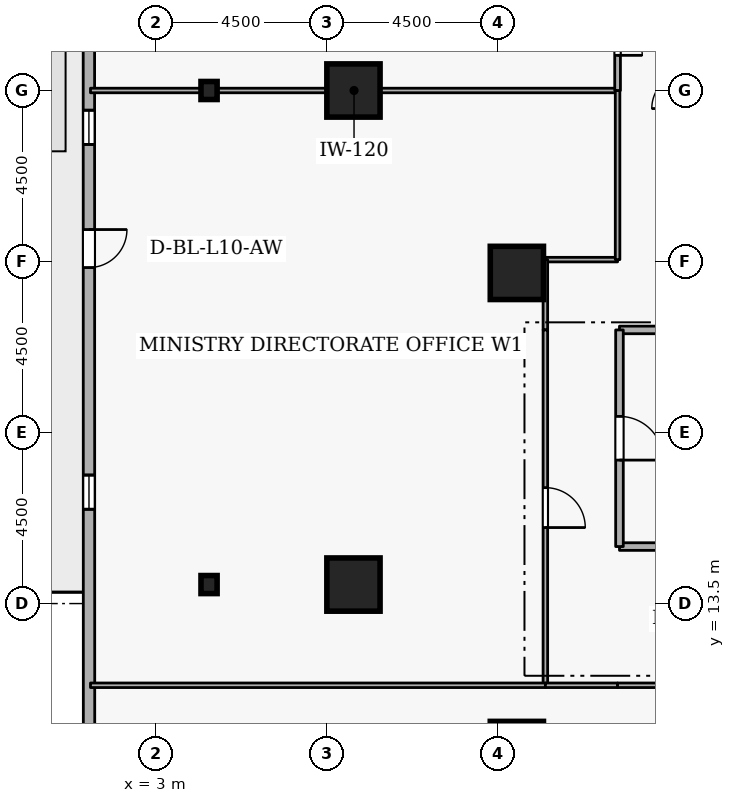
"""IFC4 building model, lengths in metres.
Left out: names, types, materials, properties, quantities, classifications, styles, units other than length and angle.
Written with IfcOpenShell. Run it as: python <this file> out.ifc"""

import sys

from ifc_helpers import new_model, si_unit, direction, frame, frame_2d, origin, origin_2d, place, context, subcontext, project, spatial, rectangle, i_section, extrude, element, fill, save


model = new_model("IFC4")
c1 = context("Model", 3, precision=1e-05, world=origin(), true_north=direction((0.0, 1.0)))
c2 = subcontext(c1, "Body", "Model", "MODEL_VIEW")
j1 = project(units=[si_unit("LENGTHUNIT", "METRE"), si_unit("PLANEANGLEUNIT", "RADIAN")], contexts=[c1])
p1 = place(None, origin())
s1 = spatial("IfcSite", under=j1, at=p1, CompositionType="ELEMENT")
p2 = place(p1, origin())
s2 = spatial("IfcBuilding", under=s1, at=p2, CompositionType="ELEMENT")
p3 = place(p2, frame((0.0, 0.0, 42.3)))
s3 = spatial("IfcBuildingStorey", under=s2, at=p3, CompositionType="ELEMENT", Elevation=42.3)
for number, where, z_axis, x_axis in (
    (1, (12.5, 9.7, 0.0), (0.0, 0.0, 1.0), (1.0, 0.0, 0.0)),
    (2, (8.2, 14.0, 0.0), (0.0, 0.0, 1.0), (1.0, 0.0, 0.0)),
    (3, (8.2, 27.0, 0.0), (0.0, 0.0, 1.0), (1.0, 0.0, 0.0)),
    (4, (12.5, 22.2, 0.0), (0.0, 0.0, 1.0), (1.0, 0.0, 0.0)),
):
    element("IfcColumn", number, at=place(p3, frame(where, z_axis=z_axis, x_axis=x_axis)), inside=s3, PredefinedType="COLUMN", context=c2, shape_type="SweptSolid", body=[
        extrude(rectangle(XDim=1.4, YDim=1.4, at=origin_2d()), origin(), (0.0, 0.0, 1.0), 3.6),
    ])
for number, where, z_axis, x_axis in (
    (5, (4.4, 14.0, 0.0), (0.0, 0.0, 1.0), (1.0, 0.0, 0.0)),
    (6, (4.4, 27.0, 0.0), (0.0, 0.0, 1.0), (1.0, 0.0, 0.0)),
):
    element("IfcColumn", number, at=place(p3, frame(where, z_axis=z_axis, x_axis=x_axis)), inside=s3, PredefinedType="COLUMN", context=c2, shape_type="SweptSolid", body=[
        extrude(i_section(OverallWidth=0.424, OverallDepth=0.475, WebThickness=0.048, FlangeThickness=0.077, FilletRadius=0.015, at=origin_2d()), origin(), (0.0, 0.0, 1.0), 3.6),
    ])
p4 = place(p3, frame((1.235, 42.681, 0.0), z_axis=(0.0, 0.0, 1.0), x_axis=(0.000208784245, -0.999999978205, 0.0)))
e7 = element("IfcWall", 7, at=p4, inside=s3, PredefinedType="STANDARD", context=c2, shape_type="SweptSolid", body=[
    extrude(rectangle(XDim=35.08, YDim=0.3, at=frame_2d((17.54, 0.0))), origin(), (0.0, 0.0, 1.0), 2.7),
])
p5 = place(p4, frame((19.34, 0.0, 0.0)))
e8 = element("IfcOpeningElement", 8, at=p5, cuts=e7, PredefinedType="OPENING", context=c2, shape_type="SweptSolid", body=[
    extrude(rectangle(XDim=1.0, YDim=2.08, at=frame_2d((0.5, 1.04))), frame((0.0, 0.16, 0.0), z_axis=(0.0, -1.0, 0.0), x_axis=(1.0, 0.0, 0.0)), (0.0, 0.0, 1.0), 0.32),
])
p6 = place(p4, frame((1.8, 0.0, 0.72)))
e9 = element("IfcOpeningElement", 9, at=p6, cuts=e7, PredefinedType="OPENING", context=c2, shape_type="SweptSolid", body=[
    extrude(rectangle(XDim=0.9, YDim=1.75, at=frame_2d((0.45, 0.875))), frame((0.0, 0.16, 0.0), z_axis=(0.0, -1.0, 0.0), x_axis=(1.0, 0.0, 0.0)), (0.0, 0.0, 1.0), 0.32),
])
p7 = place(p4, frame((6.6, 0.0, 0.72)))
e10 = element("IfcOpeningElement", 10, at=p7, cuts=e7, PredefinedType="OPENING", context=c2, shape_type="SweptSolid", body=[
    extrude(rectangle(XDim=0.9, YDim=1.75, at=frame_2d((0.45, 0.875))), frame((0.0, 0.16, 0.0), z_axis=(0.0, -1.0, 0.0), x_axis=(1.0, 0.0, 0.0)), (0.0, 0.0, 1.0), 0.32),
])
p8 = place(p4, frame((11.4, 0.0, 0.72)))
e11 = element("IfcOpeningElement", 11, at=p8, cuts=e7, PredefinedType="OPENING", context=c2, shape_type="SweptSolid", body=[
    extrude(rectangle(XDim=0.9, YDim=1.75, at=frame_2d((0.45, 0.875))), frame((0.0, 0.16, 0.0), z_axis=(0.0, -1.0, 0.0), x_axis=(1.0, 0.0, 0.0)), (0.0, 0.0, 1.0), 0.32),
])
p9 = place(p4, frame((16.2, 0.0, 0.72)))
e12 = element("IfcOpeningElement", 12, at=p9, cuts=e7, PredefinedType="OPENING", context=c2, shape_type="SweptSolid", body=[
    extrude(rectangle(XDim=0.9, YDim=1.75, at=frame_2d((0.45, 0.875))), frame((0.0, 0.16, 0.0), z_axis=(0.0, -1.0, 0.0), x_axis=(1.0, 0.0, 0.0)), (0.0, 0.0, 1.0), 0.32),
])
p10 = place(p4, frame((25.8, 0.0, 0.72)))
e13 = element("IfcOpeningElement", 13, at=p10, cuts=e7, PredefinedType="OPENING", context=c2, shape_type="SweptSolid", body=[
    extrude(rectangle(XDim=0.9, YDim=1.75, at=frame_2d((0.45, 0.875))), frame((0.0, 0.16, 0.0), z_axis=(0.0, -1.0, 0.0), x_axis=(1.0, 0.0, 0.0)), (0.0, 0.0, 1.0), 0.32),
])
for number, where, z_axis, x_axis in (
    (14, (15.2, 15.0, 0.0), (0.0, 0.0, 1.0), (1.0, 0.0, 0.0)),
    (15, (17.7, 20.7, 0.0), (0.0, 0.0, 1.0), (-1.0, 0.0, 0.0)),
):
    element("IfcWall", number, at=place(p3, frame(where, z_axis=z_axis, x_axis=x_axis)), inside=s3, PredefinedType="STANDARD", context=c2, shape_type="SweptSolid", body=[
        extrude(rectangle(XDim=2.5, YDim=0.2, at=frame_2d((1.25, 0.0))), origin(), (0.0, 0.0, 1.0), 3.34),
    ])
p11 = place(p3, frame((15.2, 20.7, 0.0), z_axis=(0.0, 0.0, 1.0), x_axis=(0.0, -1.0, 0.0)))
e16 = element("IfcWall", 16, at=p11, inside=s3, PredefinedType="STANDARD", context=c2, shape_type="SweptSolid", body=[
    extrude(rectangle(XDim=5.7, YDim=0.2, at=frame_2d((2.85, 0.0))), origin(), (0.0, 0.0, 1.0), 3.34),
])
p12 = place(p11, frame((2.275, 0.0, 0.0)))
e17 = element("IfcOpeningElement", 17, at=p12, cuts=e16, PredefinedType="OPENING", context=c2, shape_type="SweptSolid", body=[
    extrude(rectangle(XDim=1.15, YDim=2.1, at=frame_2d((0.575, 1.05))), frame((0.0, 0.11, 0.0), z_axis=(0.0, -1.0, 0.0), x_axis=(1.0, 0.0, 0.0)), (0.0, 0.0, 1.0), 0.22),
])
p13 = place(p3, frame((15.15, 22.55, 0.0), z_axis=(0.0, 0.0, 1.0), x_axis=(-1.0, 0.0, 0.0)))
e18 = element("IfcWall", 18, at=p13, inside=s3, PredefinedType="PARTITIONING", context=c2, shape_type="SweptSolid", body=[
    extrude(rectangle(XDim=1.9, YDim=0.12, at=frame_2d((0.95, 0.0))), origin(), (0.0, 0.0, 1.0), 3.34),
])
p14 = place(p3, frame((13.25, 22.55, 0.0), z_axis=(0.0, 0.0, 1.0), x_axis=(0.0, -1.0, 0.0)))
e19 = element("IfcWall", 19, at=p14, inside=s3, PredefinedType="PARTITIONING", context=c2, shape_type="SweptSolid", body=[
    extrude(rectangle(XDim=1.85, YDim=0.12, at=frame_2d((0.925, 0.0))), origin(), (0.0, 0.0, 1.0), 3.34),
])
p15 = place(p3, frame((13.25, 20.7, 0.0), z_axis=(0.0, 0.0, 1.0), x_axis=(0.0, -1.0, 0.0)))
e20 = element("IfcWall", 20, at=p15, inside=s3, PredefinedType="PARTITIONING", context=c2, shape_type="SweptSolid", body=[
    extrude(rectangle(XDim=9.35, YDim=0.12, at=frame_2d((4.675, 0.0))), origin(), (0.0, 0.0, 1.0), 3.34),
])
p16 = place(p15, frame((4.15, 0.0, 0.0)))
e21 = element("IfcOpeningElement", 21, at=p16, cuts=e20, PredefinedType="OPENING", context=c2, shape_type="SweptSolid", body=[
    extrude(rectangle(XDim=1.05, YDim=2.1, at=frame_2d((0.525, 1.05))), frame((0.0, 0.07, 0.0), z_axis=(0.0, -1.0, 0.0), x_axis=(1.0, 0.0, 0.0)), (0.0, 0.0, 1.0), 0.14),
])
p17 = place(p3, frame((13.25, 11.35, 0.0), z_axis=(0.0, 0.0, 1.0), x_axis=(-1.0, 0.0, 0.0)))
e22 = element("IfcWall", 22, at=p17, inside=s3, PredefinedType="PARTITIONING", context=c2, shape_type="SweptSolid", body=[
    extrude(rectangle(XDim=11.97, YDim=0.12, at=frame_2d((5.985, 0.0))), origin(), (0.0, 0.0, 1.0), 3.34),
])
p18 = place(p3, frame((1.28, 27.0, 0.0), z_axis=(0.0, 0.0, 1.0), x_axis=(1.0, 0.0, 0.0)))
e23 = element("IfcWall", 23, at=p18, inside=s3, PredefinedType="PARTITIONING", context=c2, shape_type="SweptSolid", body=[
    extrude(rectangle(XDim=13.87, YDim=0.12, at=frame_2d((6.935, 0.0))), origin(), (0.0, 0.0, 1.0), 2.882),
])
p19 = place(p3, frame((15.15, 27.0, 0.0), z_axis=(0.0, 0.0, 1.0), x_axis=(0.0, -1.0, 0.0)))
e24 = element("IfcWall", 24, at=p19, inside=s3, PredefinedType="PARTITIONING", context=c2, shape_type="SweptSolid", body=[
    extrude(rectangle(XDim=4.45, YDim=0.12, at=frame_2d((2.225, 0.0))), origin(), (0.0, 0.0, 1.0), 3.34),
])
p20 = place(p3, frame((15.15, 30.15, 0.0), z_axis=(0.0, 0.0, 1.0), x_axis=(0.0, -1.0, 0.0)))
e25 = element("IfcWall", 25, at=p20, inside=s3, PredefinedType="PARTITIONING", context=c2, shape_type="SweptSolid", body=[
    extrude(rectangle(XDim=3.15, YDim=0.15, at=frame_2d((1.575, 0.0))), origin(), (0.0, 0.0, 1.0), 3.34),
])
p21 = place(p20, frame((0.925, 0.0, 0.0)))
e26 = element("IfcOpeningElement", 26, at=p21, cuts=e25, PredefinedType="OPENING", context=c2, shape_type="SweptSolid", body=[
    extrude(rectangle(XDim=1.3, YDim=2.12, at=frame_2d((0.65, 1.06))), frame((0.0, 0.085, 0.0), z_axis=(0.0, -1.0, 0.0), x_axis=(1.0, 0.0, 0.0)), (0.0, 0.0, 1.0), 0.17),
])
p22 = place(p3, frame((13.25, 11.35, 0.0), z_axis=(0.0, 0.0, 1.0), x_axis=(1.0, 0.0, 0.0)))
e27 = element("IfcWall", 27, at=p22, inside=s3, PredefinedType="PARTITIONING", context=c2, shape_type="SweptSolid", body=[
    extrude(rectangle(XDim=1.9, YDim=0.12, at=frame_2d((0.95, 0.0))), origin(), (0.0, 0.0, 1.0), 3.34),
])
p23 = place(p3, frame((15.15, 11.35, 0.0), z_axis=(0.0, 0.0, 1.0), x_axis=(1.0, 0.0, 0.0)))
e28 = element("IfcWall", 28, at=p23, inside=s3, PredefinedType="PARTITIONING", context=c2, shape_type="SweptSolid", body=[
    extrude(rectangle(XDim=4.85, YDim=0.12, at=frame_2d((2.425, 0.0))), origin(), (0.0, 0.0, 1.0), 3.34),
])
p24 = place(p23, frame((1.9, 0.0, 0.0)))
e29 = element("IfcOpeningElement", 29, at=p24, cuts=e28, PredefinedType="OPENING", context=c2, shape_type="SweptSolid", body=[
    extrude(rectangle(XDim=1.05, YDim=2.1, at=frame_2d((0.525, 1.05))), frame((0.0, 0.07, 0.0), z_axis=(0.0, -1.0, 0.0), x_axis=(1.0, 0.0, 0.0)), (0.0, 0.0, 1.0), 0.14),
])
p25 = place(p5, origin())
e30 = element("IfcDoor", 30, at=p25, inside=s3, OperationType="SINGLE_SWING_LEFT", PredefinedType="DOOR", context=c2, shape_type="SweptSolid", body=[
    extrude(rectangle(XDim=1.0, YDim=2.08, at=frame_2d((0.5, 1.04))), frame((0.0, 0.025, 0.0), z_axis=(0.0, -1.0, 0.0), x_axis=(1.0, 0.0, 0.0)), (0.0, 0.0, 1.0), 0.05),
])
fill(e8, e30)
p26 = place(p9, origin())
e31 = element("IfcWindow", 31, at=p26, inside=s3, PartitioningType="SINGLE_PANEL", PredefinedType="WINDOW", context=c2, shape_type="SweptSolid", body=[
    extrude(rectangle(XDim=0.9, YDim=1.75, at=frame_2d((0.45, 0.875))), frame((0.0, 0.03, 0.0), z_axis=(0.0, -1.0, 0.0), x_axis=(1.0, 0.0, 0.0)), (0.0, 0.0, 1.0), 0.06),
])
fill(e12, e31)
p27 = place(p10, origin())
e32 = element("IfcWindow", 32, at=p27, inside=s3, PartitioningType="SINGLE_PANEL", PredefinedType="WINDOW", context=c2, shape_type="SweptSolid", body=[
    extrude(rectangle(XDim=0.9, YDim=1.75, at=frame_2d((0.45, 0.875))), frame((0.0, 0.03, 0.0), z_axis=(0.0, -1.0, 0.0), x_axis=(1.0, 0.0, 0.0)), (0.0, 0.0, 1.0), 0.06),
])
fill(e13, e32)
p28 = place(p12, origin())
e33 = element("IfcDoor", 33, at=p28, inside=s3, OperationType="SINGLE_SWING_RIGHT", PredefinedType="DOOR", context=c2, shape_type="SweptSolid", body=[
    extrude(rectangle(XDim=1.15, YDim=2.1, at=frame_2d((0.575, 1.05))), frame((0.0, 0.025, 0.0), z_axis=(0.0, -1.0, 0.0), x_axis=(1.0, 0.0, 0.0)), (0.0, 0.0, 1.0), 0.05),
])
fill(e17, e33)
p29 = place(p16, origin())
e34 = element("IfcDoor", 34, at=p29, inside=s3, OperationType="SINGLE_SWING_RIGHT", PredefinedType="DOOR", context=c2, shape_type="SweptSolid", body=[
    extrude(rectangle(XDim=1.05, YDim=2.1, at=frame_2d((0.525, 1.05))), frame((0.0, 0.025, 0.0), z_axis=(0.0, -1.0, 0.0), x_axis=(1.0, 0.0, 0.0)), (0.0, 0.0, 1.0), 0.05),
])
fill(e21, e34)
p30 = place(p21, origin())
e35 = element("IfcDoor", 35, at=p30, inside=s3, OperationType="DOUBLE_DOOR_SINGLE_SWING", PredefinedType="DOOR", context=c2, shape_type="SweptSolid", body=[
    extrude(rectangle(XDim=1.3, YDim=2.12, at=frame_2d((0.65, 1.06))), frame((0.0, 0.025, 0.0), z_axis=(0.0, -1.0, 0.0), x_axis=(1.0, 0.0, 0.0)), (0.0, 0.0, 1.0), 0.05),
])
fill(e26, e35)
save(model, sys.argv[1])
